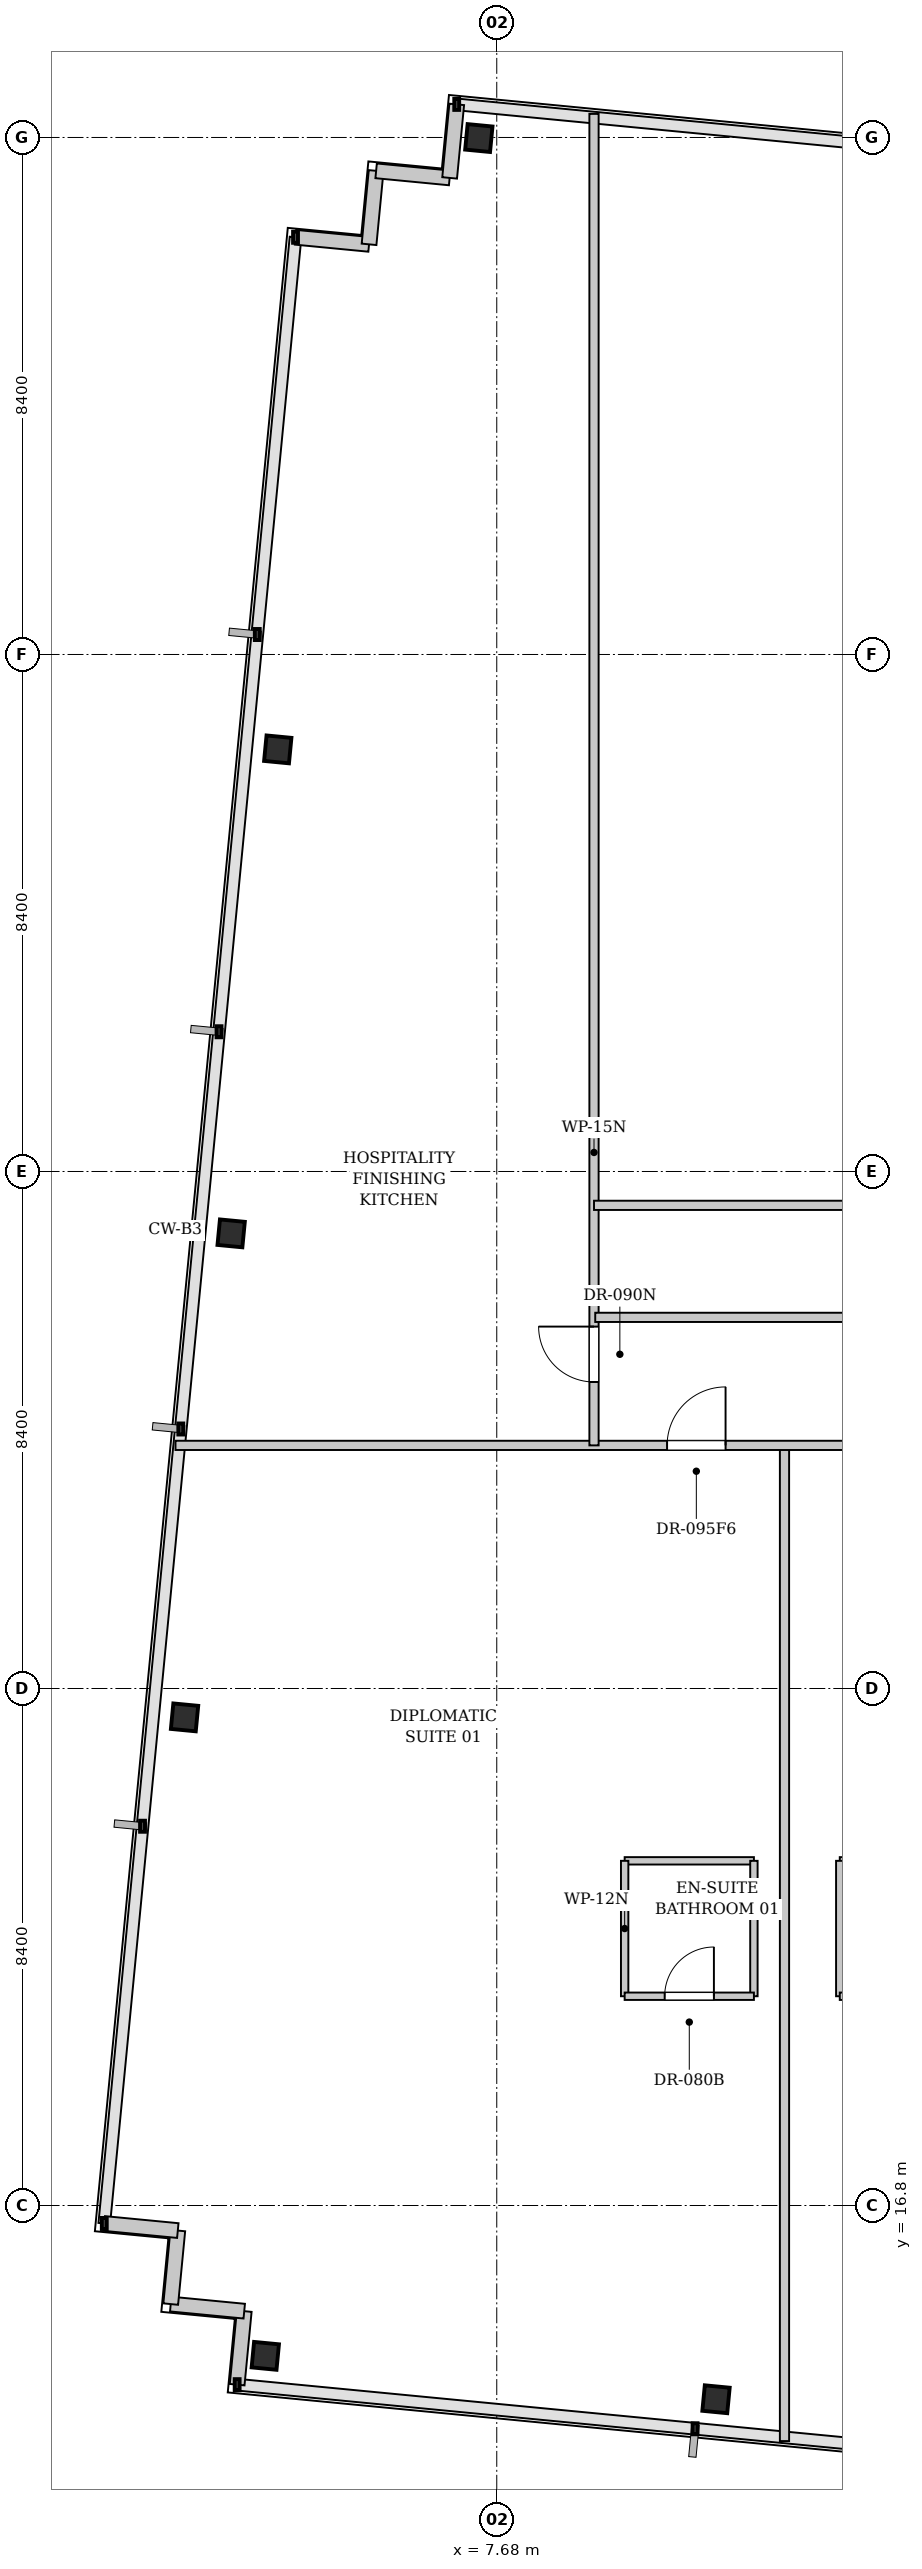
"""IFC4 building model, lengths in metres.
Left out: names, types, materials, properties, quantities, classifications, styles, units other than length and angle.
Written with IfcOpenShell. Run it as: python <this file> out.ifc"""

import sys

from ifc_helpers import new_model, si_unit, direction, frame, frame_2d, origin, origin_2d, place, context, subcontext, project, spatial, rectangle, i_section, extrude, element, fill, save


model = new_model("IFC4")
c1 = context("Model", 3, precision=1e-05, world=origin(), true_north=direction((0.0, 1.0)))
c2 = subcontext(c1, "Body", "Model", "MODEL_VIEW")
j1 = project(units=[si_unit("LENGTHUNIT", "METRE"), si_unit("PLANEANGLEUNIT", "RADIAN")], contexts=[c1])
p1 = place(None, origin())
s1 = spatial("IfcSite", under=j1, at=p1, CompositionType="ELEMENT")
p2 = place(p1, origin())
s2 = spatial("IfcBuilding", under=s1, at=p2, CompositionType="ELEMENT")
p3 = place(p2, frame((0.0, 0.0, 178.7)))
s3 = spatial("IfcBuildingStorey", under=s2, at=p3, CompositionType="ELEMENT", Elevation=178.7)
for number, where, z_axis, x_axis in (
    (1, (3.919, 14.357, 0.0), (0.0, 0.0, 1.0), (0.995, -0.096, 0.0)),
    (2, (11.242, 13.652, 0.0), (0.0, 0.0, 1.0), (0.995, -0.096, 0.0)),
    (3, (7.389, 50.391, 0.0), (0.0, 0.0, 1.0), (0.995, -0.096, 0.0)),
    (4, (2.607, 24.731, 0.0), (0.0, 0.0, 1.0), (0.995, -0.096, 0.0)),
    (5, (3.365, 32.594, 0.0), (0.0, 0.0, 1.0), (0.995, -0.096, 0.0)),
    (6, (4.122, 40.458, 0.0), (0.0, 0.0, 1.0), (0.995, -0.096, 0.0)),
):
    element("IfcColumn", number, at=place(p3, frame(where, z_axis=z_axis, x_axis=x_axis)), inside=s3, PredefinedType="COLUMN", context=c2, shape_type="SweptSolid", body=[
        extrude(i_section(OverallWidth=0.406, OverallDepth=0.416, WebThickness=0.03, FlangeThickness=0.048, FilletRadius=0.015, at=origin_2d()), origin(), (0.0, 0.0, 1.0), 3.3),
    ])
for number, where, z_axis, x_axis in (
    (7, (3.462, 13.889, 0.0), (0.0, 0.0, 1.0), (0.096, 0.995, 0.0)),
    (8, (3.577, 15.083, 0.0), (0.0, 0.0, 1.0), (-0.995, 0.096, 0.0)),
):
    element("IfcWall", number, at=place(p3, frame(where, z_axis=z_axis, x_axis=x_axis)), inside=s3, PredefinedType="SOLIDWALL", context=c2, shape_type="SweptSolid", body=[
        extrude(rectangle(XDim=1.2, YDim=0.24, at=frame_2d((0.6, 0.0))), origin(), (0.0, 0.0, 1.0), 3.08),
    ])
p4 = place(p3, frame((2.383, 15.198, 0.0), z_axis=(0.0, 0.0, 1.0), x_axis=(0.095836473879, 0.995397091755, 0.0)))
e9 = element("IfcWall", 9, at=p4, inside=s3, PredefinedType="SOLIDWALL", context=c2, shape_type="SweptSolid", body=[
    extrude(rectangle(XDim=1.2, YDim=0.24, at=frame_2d((0.6, 0.0))), origin(), (0.0, 0.0, 1.0), 3.08),
])
p5 = place(p3, frame((2.498, 16.393, 0.0), z_axis=(0.0, 0.0, 1.0), x_axis=(-0.995398960025, 0.095817067274, 0.0)))
e10 = element("IfcWall", 10, at=p5, inside=s3, PredefinedType="SOLIDWALL", context=c2, shape_type="SweptSolid", body=[
    extrude(rectangle(XDim=1.2, YDim=0.24, at=frame_2d((0.6, 0.0))), origin(), (0.0, 0.0, 1.0), 3.08),
])
p6 = place(p3, frame((4.411, 48.779, 0.0), z_axis=(0.0, 0.0, 1.0), x_axis=(0.995397091755, -0.095836473879, 0.0)))
e11 = element("IfcWall", 11, at=p6, inside=s3, PredefinedType="SOLIDWALL", context=c2, shape_type="SweptSolid", body=[
    extrude(rectangle(XDim=1.2, YDim=0.24, at=frame_2d((0.6, 0.0))), origin(), (0.0, 0.0, 1.0), 3.08),
])
p7 = place(p3, frame((5.605, 48.664, 0.0), z_axis=(0.0, 0.0, 1.0), x_axis=(0.096018626938, 0.995379537303, 0.0)))
e12 = element("IfcWall", 12, at=p7, inside=s3, PredefinedType="SOLIDWALL", context=c2, shape_type="SweptSolid", body=[
    extrude(rectangle(XDim=1.2, YDim=0.24, at=frame_2d((0.6, 0.0))), origin(), (0.0, 0.0, 1.0), 3.08),
])
for number, where, z_axis, x_axis in (
    (13, (5.72, 49.858, 0.0), (0.0, 0.0, 1.0), (0.995, -0.096, 0.0)),
    (14, (6.915, 49.743, 0.0), (0.0, 0.0, 1.0), (0.096, 0.995, 0.0)),
):
    element("IfcWall", number, at=place(p3, frame(where, z_axis=z_axis, x_axis=x_axis)), inside=s3, PredefinedType="SOLIDWALL", context=c2, shape_type="SweptSolid", body=[
        extrude(rectangle(XDim=1.2, YDim=0.24, at=frame_2d((0.6, 0.0))), origin(), (0.0, 0.0, 1.0), 3.08),
    ])
p8 = place(p3, frame((9.758, 22.4, 0.0), z_axis=(0.0, 0.0, 1.0), x_axis=(1.0, 0.0, 0.0)))
e15 = element("IfcWall", 15, at=p8, inside=s3, PredefinedType="PARTITIONING", context=c2, shape_type="SweptSolid", body=[
    extrude(rectangle(XDim=2.1, YDim=0.12, at=frame_2d((1.05, 0.0))), origin(), (0.0, 0.0, 1.0), 3.08),
])
for number, where, z_axis, x_axis in (
    (16, (9.758, 20.2, 0.0), (0.0, 0.0, 1.0), (0.0, 1.0, 0.0)),
    (17, (11.858, 20.2, 0.0), (0.0, 0.0, 1.0), (0.0, 1.0, 0.0)),
):
    element("IfcWall", number, at=place(p3, frame(where, z_axis=z_axis, x_axis=x_axis)), inside=s3, PredefinedType="PARTITIONING", context=c2, shape_type="SweptSolid", body=[
        extrude(rectangle(XDim=2.2, YDim=0.12, at=frame_2d((1.1, 0.0))), origin(), (0.0, 0.0, 1.0), 3.08),
    ])
p9 = place(p3, frame((9.758, 20.2, 0.0), z_axis=(0.0, 0.0, 1.0), x_axis=(1.0, 0.0, 0.0)))
e18 = element("IfcWall", 18, at=p9, inside=s3, PredefinedType="PARTITIONING", context=c2, shape_type="SweptSolid", body=[
    extrude(rectangle(XDim=2.1, YDim=0.12, at=frame_2d((1.05, 0.0))), origin(), (0.0, 0.0, 1.0), 3.08),
])
p10 = place(p9, frame((0.65, 0.0, 0.0)))
e19 = element("IfcOpeningElement", 19, at=p10, cuts=e18, PredefinedType="OPENING", context=c2, shape_type="SweptSolid", body=[
    extrude(rectangle(XDim=0.8, YDim=2.1, at=frame_2d((0.4, 1.05))), frame((0.0, 0.07, 0.0), z_axis=(0.0, -1.0, 0.0), x_axis=(1.0, 0.0, 0.0)), (0.0, 0.0, 1.0), 0.14),
])
p11 = place(p3, frame((13.253, 22.4, 0.0), z_axis=(0.0, 0.0, 1.0), x_axis=(1.0, 0.0, 0.0)))
e20 = element("IfcWall", 20, at=p11, inside=s3, PredefinedType="PARTITIONING", context=c2, shape_type="SweptSolid", body=[
    extrude(rectangle(XDim=2.1, YDim=0.12, at=frame_2d((1.05, 0.0))), origin(), (0.0, 0.0, 1.0), 3.08),
])
p12 = place(p3, frame((13.253, 20.2, 0.0), z_axis=(0.0, 0.0, 1.0), x_axis=(0.0, 1.0, 0.0)))
e21 = element("IfcWall", 21, at=p12, inside=s3, PredefinedType="PARTITIONING", context=c2, shape_type="SweptSolid", body=[
    extrude(rectangle(XDim=2.2, YDim=0.12, at=frame_2d((1.1, 0.0))), origin(), (0.0, 0.0, 1.0), 3.08),
])
p13 = place(p3, frame((13.253, 20.2, 0.0), z_axis=(0.0, 0.0, 1.0), x_axis=(1.0, 0.0, 0.0)))
e22 = element("IfcWall", 22, at=p13, inside=s3, PredefinedType="PARTITIONING", context=c2, shape_type="SweptSolid", body=[
    extrude(rectangle(XDim=2.1, YDim=0.12, at=frame_2d((1.05, 0.0))), origin(), (0.0, 0.0, 1.0), 3.08),
])
p14 = place(p13, frame((0.65, 0.0, 0.0)))
e23 = element("IfcOpeningElement", 23, at=p14, cuts=e22, PredefinedType="OPENING", context=c2, shape_type="SweptSolid", body=[
    extrude(rectangle(XDim=0.8, YDim=2.1, at=frame_2d((0.4, 1.05))), frame((0.0, 0.07, 0.0), z_axis=(0.0, -1.0, 0.0), x_axis=(1.0, 0.0, 0.0)), (0.0, 0.0, 1.0), 0.14),
])
p15 = place(p3, frame((12.355, 12.972, 0.0), z_axis=(0.0, 0.0, 1.0), x_axis=(0.0, 1.0, 0.0)))
e24 = element("IfcWall", 24, at=p15, inside=s3, PredefinedType="PARTITIONING", context=c2, shape_type="SweptSolid", body=[
    extrude(rectangle(XDim=16.198, YDim=0.15, at=frame_2d((8.099, 0.0))), origin(), (0.0, 0.0, 1.0), 3.08),
])
p16 = place(p3, frame((2.46, 29.15, 0.0), z_axis=(0.0, 0.0, 1.0), x_axis=(1.0, 0.0, 0.0)))
e25 = element("IfcWall", 25, at=p16, inside=s3, PredefinedType="PARTITIONING", context=c2, shape_type="SweptSolid", body=[
    extrude(rectangle(XDim=57.505, YDim=0.15, at=frame_2d((28.752, 0.0))), origin(), (0.0, 0.0, 1.0), 2.475),
])
p17 = place(p16, frame((7.987, 0.0, 0.0)))
e26 = element("IfcOpeningElement", 26, at=p17, cuts=e25, PredefinedType="OPENING", context=c2, shape_type="SweptSolid", body=[
    extrude(rectangle(XDim=0.95, YDim=2.15, at=frame_2d((0.475, 1.075))), frame((0.0, 0.085, 0.0), z_axis=(0.0, -1.0, 0.0), x_axis=(1.0, 0.0, 0.0)), (0.0, 0.0, 1.0), 0.17),
])
p18 = place(p16, frame((11.483, 0.0, 0.0)))
e27 = element("IfcOpeningElement", 27, at=p18, cuts=e25, PredefinedType="OPENING", context=c2, shape_type="SweptSolid", body=[
    extrude(rectangle(XDim=0.95, YDim=2.15, at=frame_2d((0.475, 1.075))), frame((0.0, 0.085, 0.0), z_axis=(0.0, -1.0, 0.0), x_axis=(1.0, 0.0, 0.0)), (0.0, 0.0, 1.0), 0.17),
])
p19 = place(p16, frame((15.951, 0.0, 0.0)))
e28 = element("IfcOpeningElement", 28, at=p19, cuts=e25, PredefinedType="OPENING", context=c2, shape_type="SweptSolid", body=[
    extrude(rectangle(XDim=0.95, YDim=2.15, at=frame_2d((0.475, 1.075))), frame((0.0, 0.085, 0.0), z_axis=(0.0, -1.0, 0.0), x_axis=(1.0, 0.0, 0.0)), (0.0, 0.0, 1.0), 0.17),
])
p20 = place(p16, frame((20.991, 0.0, 0.0)))
e29 = element("IfcOpeningElement", 29, at=p20, cuts=e25, PredefinedType="OPENING", context=c2, shape_type="SweptSolid", body=[
    extrude(rectangle(XDim=0.95, YDim=2.15, at=frame_2d((0.475, 1.075))), frame((0.0, 0.085, 0.0), z_axis=(0.0, -1.0, 0.0), x_axis=(1.0, 0.0, 0.0)), (0.0, 0.0, 1.0), 0.17),
])
p21 = place(p16, frame((26.032, 0.0, 0.0)))
e30 = element("IfcOpeningElement", 30, at=p21, cuts=e25, PredefinedType="OPENING", context=c2, shape_type="SweptSolid", body=[
    extrude(rectangle(XDim=0.95, YDim=2.15, at=frame_2d((0.475, 1.075))), frame((0.0, 0.085, 0.0), z_axis=(0.0, -1.0, 0.0), x_axis=(1.0, 0.0, 0.0)), (0.0, 0.0, 1.0), 0.17),
])
p22 = place(p16, frame((31.072, 0.0, 0.0)))
e31 = element("IfcOpeningElement", 31, at=p22, cuts=e25, PredefinedType="OPENING", context=c2, shape_type="SweptSolid", body=[
    extrude(rectangle(XDim=0.95, YDim=2.15, at=frame_2d((0.475, 1.075))), frame((0.0, 0.085, 0.0), z_axis=(0.0, -1.0, 0.0), x_axis=(1.0, 0.0, 0.0)), (0.0, 0.0, 1.0), 0.17),
])
p23 = place(p16, frame((36.113, 0.0, 0.0)))
e32 = element("IfcOpeningElement", 32, at=p23, cuts=e25, PredefinedType="OPENING", context=c2, shape_type="SweptSolid", body=[
    extrude(rectangle(XDim=0.95, YDim=2.15, at=frame_2d((0.475, 1.075))), frame((0.0, 0.085, 0.0), z_axis=(0.0, -1.0, 0.0), x_axis=(1.0, 0.0, 0.0)), (0.0, 0.0, 1.0), 0.17),
])
p24 = place(p16, frame((41.154, 0.0, 0.0)))
e33 = element("IfcOpeningElement", 33, at=p24, cuts=e25, PredefinedType="OPENING", context=c2, shape_type="SweptSolid", body=[
    extrude(rectangle(XDim=0.95, YDim=2.15, at=frame_2d((0.475, 1.075))), frame((0.0, 0.085, 0.0), z_axis=(0.0, -1.0, 0.0), x_axis=(1.0, 0.0, 0.0)), (0.0, 0.0, 1.0), 0.17),
])
p25 = place(p16, frame((46.042, 0.0, 0.0)))
e34 = element("IfcOpeningElement", 34, at=p25, cuts=e25, PredefinedType="OPENING", context=c2, shape_type="SweptSolid", body=[
    extrude(rectangle(XDim=0.95, YDim=2.15, at=frame_2d((0.475, 1.075))), frame((0.0, 0.085, 0.0), z_axis=(0.0, -1.0, 0.0), x_axis=(1.0, 0.0, 0.0)), (0.0, 0.0, 1.0), 0.17),
])
p26 = place(p16, frame((50.377, 0.0, 0.0)))
e35 = element("IfcOpeningElement", 35, at=p26, cuts=e25, PredefinedType="OPENING", context=c2, shape_type="SweptSolid", body=[
    extrude(rectangle(XDim=0.95, YDim=2.15, at=frame_2d((0.475, 1.075))), frame((0.0, 0.085, 0.0), z_axis=(0.0, -1.0, 0.0), x_axis=(1.0, 0.0, 0.0)), (0.0, 0.0, 1.0), 0.17),
])
p27 = place(p3, frame((9.26, 29.15, 0.0), z_axis=(0.0, 0.0, 1.0), x_axis=(0.0, 1.0, 0.0)))
e36 = element("IfcWall", 36, at=p27, inside=s3, PredefinedType="PARTITIONING", context=c2, shape_type="SweptSolid", body=[
    extrude(rectangle(XDim=21.633, YDim=0.15, at=frame_2d((10.817, 0.0))), origin(), (0.0, 0.0, 1.0), 3.08),
])
p28 = place(p27, frame((1.03, 0.0, 0.0)))
e37 = element("IfcOpeningElement", 37, at=p28, cuts=e36, PredefinedType="OPENING", context=c2, shape_type="SweptSolid", body=[
    extrude(rectangle(XDim=0.9, YDim=2.15, at=frame_2d((0.45, 1.075))), frame((0.0, 0.085, 0.0), z_axis=(0.0, -1.0, 0.0), x_axis=(1.0, 0.0, 0.0)), (0.0, 0.0, 1.0), 0.17),
])
p29 = place(p3, frame((9.26, 33.05, 0.0), z_axis=(0.0, 0.0, 1.0), x_axis=(1.0, 0.0, 0.0)))
e38 = element("IfcWall", 38, at=p29, inside=s3, PredefinedType="PARTITIONING", context=c2, shape_type="SweptSolid", body=[
    extrude(rectangle(XDim=19.24, YDim=0.15, at=frame_2d((9.62, 0.0))), origin(), (0.0, 0.0, 1.0), 2.475),
])
p30 = place(p3, frame((9.28, 31.23, 0.0), z_axis=(0.0, 0.0, 1.0), x_axis=(1.0, 0.0, 0.0)))
e39 = element("IfcWall", 39, at=p30, inside=s3, PredefinedType="PARTITIONING", context=c2, shape_type="SweptSolid", body=[
    extrude(rectangle(XDim=19.21, YDim=0.15, at=frame_2d((9.605, 0.0))), origin(), (0.0, 0.0, 1.0), 2.475),
])
p31 = place(p30, frame((7.426, 0.0, 0.0)))
e40 = element("IfcOpeningElement", 40, at=p31, cuts=e39, PredefinedType="OPENING", context=c2, shape_type="SweptSolid", body=[
    extrude(rectangle(XDim=0.9, YDim=2.15, at=frame_2d((0.45, 1.075))), frame((0.0, 0.085, 0.0), z_axis=(0.0, -1.0, 0.0), x_axis=(1.0, 0.0, 0.0)), (0.0, 0.0, 1.0), 0.17),
])
p32 = place(p30, frame((14.822, 0.0, 0.0)))
e41 = element("IfcOpeningElement", 41, at=p32, cuts=e39, PredefinedType="OPENING", context=c2, shape_type="SweptSolid", body=[
    extrude(rectangle(XDim=0.9, YDim=2.15, at=frame_2d((0.45, 1.075))), frame((0.0, 0.085, 0.0), z_axis=(0.0, -1.0, 0.0), x_axis=(1.0, 0.0, 0.0)), (0.0, 0.0, 1.0), 0.17),
])
p33 = place(p10, origin())
e42 = element("IfcDoor", 42, at=p33, inside=s3, OperationType="SINGLE_SWING_RIGHT", PredefinedType="DOOR", context=c2, shape_type="SweptSolid", body=[
    extrude(rectangle(XDim=0.8, YDim=2.1, at=frame_2d((0.4, 1.05))), frame((0.0, 0.025, 0.0), z_axis=(0.0, -1.0, 0.0), x_axis=(1.0, 0.0, 0.0)), (0.0, 0.0, 1.0), 0.05),
])
fill(e19, e42)
p34 = place(p17, origin())
e43 = element("IfcDoor", 43, at=p34, inside=s3, OperationType="SINGLE_SWING_RIGHT", PredefinedType="DOOR", context=c2, shape_type="SweptSolid", body=[
    extrude(rectangle(XDim=0.95, YDim=2.15, at=frame_2d((0.475, 1.075))), frame((0.0, 0.025, 0.0), z_axis=(0.0, -1.0, 0.0), x_axis=(1.0, 0.0, 0.0)), (0.0, 0.0, 1.0), 0.05),
])
fill(e26, e43)
p35 = place(p28, origin())
e44 = element("IfcDoor", 44, at=p35, inside=s3, OperationType="SINGLE_SWING_RIGHT", PredefinedType="DOOR", context=c2, shape_type="SweptSolid", body=[
    extrude(rectangle(XDim=0.9, YDim=2.15, at=frame_2d((0.45, 1.075))), frame((0.0, 0.025, 0.0), z_axis=(0.0, -1.0, 0.0), x_axis=(1.0, 0.0, 0.0)), (0.0, 0.0, 1.0), 0.05),
])
fill(e37, e44)
save(model, sys.argv[1])
